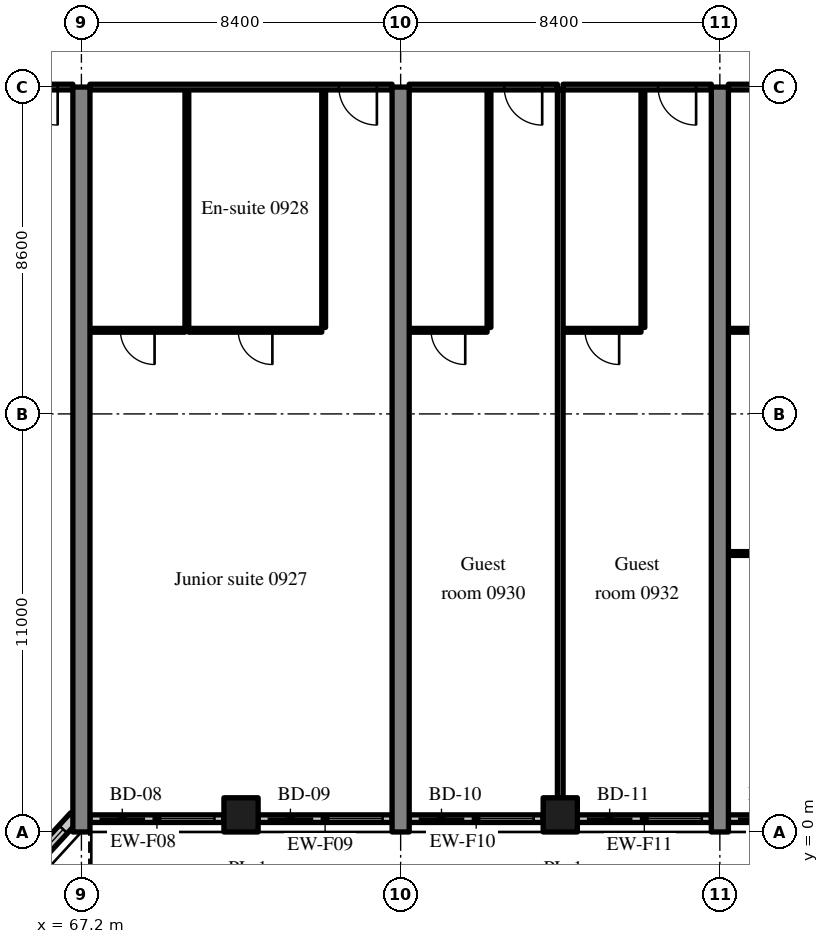
"""IFC4 building model, lengths in metres.
Left out: names, types, materials, properties, quantities, classifications, styles, units other than length and angle.
Written with IfcOpenShell. Run it as: python <this file> out.ifc"""

import sys

from ifc_helpers import new_model, si_unit, direction, frame, frame_2d, origin, origin_2d, place, context, subcontext, project, spatial, rectangle, extrude, source, transform, mapped, element, fill, save


model = new_model("IFC4")
c1 = context("Model", 3, precision=1e-05, world=origin(), true_north=direction((0.0, 1.0)))
c2 = subcontext(c1, "Body", "Model", "MODEL_VIEW")
j1 = project(units=[si_unit("LENGTHUNIT", "METRE"), si_unit("PLANEANGLEUNIT", "RADIAN")], contexts=[c1])
p1 = place(None, origin())
s1 = spatial("IfcSite", under=j1, at=p1, CompositionType="ELEMENT")
p2 = place(p1, origin())
s2 = spatial("IfcBuilding", under=s1, at=p2, CompositionType="ELEMENT")
p3 = place(p2, frame((0.0, 0.0, 43.0)))
s3 = spatial("IfcBuildingStorey", under=s2, at=p3, CompositionType="ELEMENT", Elevation=43.0)
m1 = source(origin(), c2, "Body", "SweptSolid", [
    extrude(rectangle(XDim=19.6, YDim=0.45, at=frame_2d((9.8, 0.0))), origin(), (0.0, 0.0, 1.0), 3.52),
])
for number, where, z_axis, x_axis in (
    (1, (67.2, 0.0, 0.0), (0.0, 0.0, 1.0), (0.0, 1.0, 0.0)),
    (2, (75.6, 0.0, 0.0), (0.0, 0.0, 1.0), (0.0, 1.0, 0.0)),
    (3, (84.0, 0.0, 0.0), (0.0, 0.0, 1.0), (0.0, 1.0, 0.0)),
):
    element("IfcWall", number, at=place(p3, frame(where, z_axis=z_axis, x_axis=x_axis)), inside=s3, PredefinedType="SHEAR", context=c2, shape_type="MappedRepresentation", body=[
        mapped(m1, transform((0.0, 0.0, 0.0), scale=1.0)),
    ])
m2 = source(origin(), c2, "Body", "SweptSolid", [
    extrude(rectangle(XDim=0.9, YDim=0.9, at=origin_2d()), origin(), (0.0, 0.0, 1.0), 3.52),
])
for number, where, z_axis, x_axis in (
    (4, (71.4, 0.45, 0.0), (0.0, 0.0, 1.0), (1.0, 0.0, 0.0)),
    (5, (79.8, 0.45, 0.0), (0.0, 0.0, 1.0), (1.0, 0.0, 0.0)),
):
    element("IfcColumn", number, at=place(p3, frame(where, z_axis=z_axis, x_axis=x_axis)), inside=s3, PredefinedType="COLUMN", context=c2, shape_type="MappedRepresentation", body=[
        mapped(m2, transform((0.0, 0.0, 0.0), scale=1.0)),
    ])
m3 = source(origin(), c2, "Body", "SweptSolid", [
    extrude(rectangle(XDim=2.398, YDim=0.3, at=frame_2d((1.199, 0.0))), origin(), (0.0, 0.0, 1.0), 3.52),
])
p4 = place(p3, frame((65.404, -1.369, 0.0), z_axis=(0.0, 0.0, 1.0), x_axis=(0.675374189419, 0.737475222815, 0.0)))
e6 = element("IfcWall", 6, at=p4, inside=s3, PredefinedType="SOLIDWALL", context=c2, shape_type="MappedRepresentation", body=[
    mapped(m3, transform((0.0, 0.0, 0.0), scale=1.0)),
])
m4 = source(origin(), c2, "Body", "SweptSolid", [
    extrude(rectangle(XDim=1.5, YDim=2.0, at=frame_2d((0.75, 1.0))), frame((0.0, 0.16, 0.0), z_axis=(0.0, -1.0, 0.0), x_axis=(1.0, 0.0, 0.0)), (0.0, 0.0, 1.0), 0.32),
])
p5 = place(p4, frame((0.449, 0.0, 0.9)))
e7 = element("IfcOpeningElement", 7, at=p5, cuts=e6, PredefinedType="OPENING", context=c2, shape_type="MappedRepresentation", body=[
    mapped(m4, transform((0.0, 0.0, 0.0), scale=1.0)),
])
m5 = source(origin(), c2, "Body", "SweptSolid", [
    extrude(rectangle(XDim=3.525, YDim=0.2, at=frame_2d((1.762, 0.0))), origin(), (0.0, 0.0, 1.0), 2.82),
])
p6 = place(p3, frame((67.425, 0.35, 0.0), z_axis=(0.0, 0.0, 1.0), x_axis=(1.0, 0.0, 0.0)))
e8 = element("IfcWall", 8, at=p6, inside=s3, PredefinedType="SOLIDWALL", context=c2, shape_type="MappedRepresentation", body=[
    mapped(m5, transform((0.0, 0.0, 0.0), scale=1.0)),
])
m6 = source(origin(), c2, "Body", "SweptSolid", [
    extrude(rectangle(XDim=1.2, YDim=2.4, at=frame_2d((0.6, 1.2))), frame((0.0, 0.11, 0.0), z_axis=(0.0, -1.0, 0.0), x_axis=(1.0, 0.0, 0.0)), (0.0, 0.0, 1.0), 0.22),
])
p7 = place(p6, frame((0.25, 0.0, 0.0)))
e9 = element("IfcOpeningElement", 9, at=p7, cuts=e8, PredefinedType="OPENING", context=c2, shape_type="MappedRepresentation", body=[
    mapped(m6, transform((0.0, 0.0, 0.0), scale=1.0)),
])
m7 = source(origin(), c2, "Body", "SweptSolid", [
    extrude(rectangle(XDim=1.5, YDim=1.5, at=frame_2d((0.75, 0.75))), frame((0.0, 0.11, 0.0), z_axis=(0.0, -1.0, 0.0), x_axis=(1.0, 0.0, 0.0)), (0.0, 0.0, 1.0), 0.22),
])
p8 = place(p6, frame((1.775, 0.0, 0.9)))
e10 = element("IfcOpeningElement", 10, at=p8, cuts=e8, PredefinedType="OPENING", context=c2, shape_type="MappedRepresentation", body=[
    mapped(m7, transform((0.0, 0.0, 0.0), scale=1.0)),
])
p9 = place(p3, frame((71.85, 0.35, 0.0), z_axis=(0.0, 0.0, 1.0), x_axis=(1.0, 0.0, 0.0)))
e11 = element("IfcWall", 11, at=p9, inside=s3, PredefinedType="SOLIDWALL", context=c2, shape_type="MappedRepresentation", body=[
    mapped(m5, transform((0.0, 0.0, 0.0), scale=1.0)),
])
p10 = place(p9, frame((0.25, 0.0, 0.0)))
e12 = element("IfcOpeningElement", 12, at=p10, cuts=e11, PredefinedType="OPENING", context=c2, shape_type="MappedRepresentation", body=[
    mapped(m6, transform((0.0, 0.0, 0.0), scale=1.0)),
])
p11 = place(p9, frame((1.775, 0.0, 0.9)))
e13 = element("IfcOpeningElement", 13, at=p11, cuts=e11, PredefinedType="OPENING", context=c2, shape_type="MappedRepresentation", body=[
    mapped(m7, transform((0.0, 0.0, 0.0), scale=1.0)),
])
m8 = source(origin(), c2, "Body", "SweptSolid", [
    extrude(rectangle(XDim=3.525, YDim=0.2, at=frame_2d((1.763, 0.0))), origin(), (0.0, 0.0, 1.0), 2.82),
])
p12 = place(p3, frame((75.825, 0.35, 0.0), z_axis=(0.0, 0.0, 1.0), x_axis=(1.0, 0.0, 0.0)))
e14 = element("IfcWall", 14, at=p12, inside=s3, PredefinedType="SOLIDWALL", context=c2, shape_type="MappedRepresentation", body=[
    mapped(m8, transform((0.0, 0.0, 0.0), scale=1.0)),
])
p13 = place(p12, frame((0.25, 0.0, 0.0)))
e15 = element("IfcOpeningElement", 15, at=p13, cuts=e14, PredefinedType="OPENING", context=c2, shape_type="MappedRepresentation", body=[
    mapped(m6, transform((0.0, 0.0, 0.0), scale=1.0)),
])
p14 = place(p12, frame((1.775, 0.0, 0.9)))
e16 = element("IfcOpeningElement", 16, at=p14, cuts=e14, PredefinedType="OPENING", context=c2, shape_type="MappedRepresentation", body=[
    mapped(m7, transform((0.0, 0.0, 0.0), scale=1.0)),
])
p15 = place(p3, frame((80.25, 0.35, 0.0), z_axis=(0.0, 0.0, 1.0), x_axis=(1.0, 0.0, 0.0)))
e17 = element("IfcWall", 17, at=p15, inside=s3, PredefinedType="SOLIDWALL", context=c2, shape_type="MappedRepresentation", body=[
    mapped(m5, transform((0.0, 0.0, 0.0), scale=1.0)),
])
p16 = place(p15, frame((0.25, 0.0, 0.0)))
e18 = element("IfcOpeningElement", 18, at=p16, cuts=e17, PredefinedType="OPENING", context=c2, shape_type="MappedRepresentation", body=[
    mapped(m6, transform((0.0, 0.0, 0.0), scale=1.0)),
])
p17 = place(p15, frame((1.775, 0.0, 0.9)))
e19 = element("IfcOpeningElement", 19, at=p17, cuts=e17, PredefinedType="OPENING", context=c2, shape_type="MappedRepresentation", body=[
    mapped(m7, transform((0.0, 0.0, 0.0), scale=1.0)),
])
p18 = place(p3, frame((84.225, 0.35, 0.0), z_axis=(0.0, 0.0, 1.0), x_axis=(1.0, 0.0, 0.0)))
e20 = element("IfcWall", 20, at=p18, inside=s3, PredefinedType="SOLIDWALL", context=c2, shape_type="MappedRepresentation", body=[
    mapped(m5, transform((0.0, 0.0, 0.0), scale=1.0)),
])
p19 = place(p18, frame((0.25, 0.0, 0.0)))
e21 = element("IfcOpeningElement", 21, at=p19, cuts=e20, PredefinedType="OPENING", context=c2, shape_type="MappedRepresentation", body=[
    mapped(m6, transform((0.0, 0.0, 0.0), scale=1.0)),
])
p20 = place(p18, frame((1.775, 0.0, 0.9)))
e22 = element("IfcOpeningElement", 22, at=p20, cuts=e20, PredefinedType="OPENING", context=c2, shape_type="MappedRepresentation", body=[
    mapped(m7, transform((0.0, 0.0, 0.0), scale=1.0)),
])
m9 = source(origin(), c2, "Body", "SweptSolid", [
    extrude(rectangle(XDim=3.9, YDim=0.15, at=frame_2d((1.95, 0.0))), origin(), (0.0, 0.0, 1.0), 2.82),
])
p21 = place(p3, frame((63.075, 19.6, 0.0), z_axis=(0.0, 0.0, 1.0), x_axis=(1.0, 0.0, 0.0)))
e23 = element("IfcWall", 23, at=p21, inside=s3, PredefinedType="PARTITIONING", context=c2, shape_type="MappedRepresentation", body=[
    mapped(m9, transform((0.0, 0.0, 0.0), scale=1.0)),
])
m10 = source(origin(), c2, "Body", "SweptSolid", [
    extrude(rectangle(XDim=1.0, YDim=2.1, at=frame_2d((0.5, 1.05))), frame((0.0, 0.085, 0.0), z_axis=(0.0, -1.0, 0.0), x_axis=(1.0, 0.0, 0.0)), (0.0, 0.0, 1.0), 0.17),
])
p22 = place(p21, frame((2.5, 0.0, 0.0)))
e24 = element("IfcOpeningElement", 24, at=p22, cuts=e23, PredefinedType="OPENING", context=c2, shape_type="MappedRepresentation", body=[
    mapped(m10, transform((0.0, 0.0, 0.0), scale=1.0)),
])
m11 = source(origin(), c2, "Body", "SweptSolid", [
    extrude(rectangle(XDim=6.25, YDim=0.1, at=frame_2d((3.125, 0.0))), origin(), (0.0, 0.0, 1.0), 3.52),
])
for number, where, z_axis, x_axis in (
    (25, (73.575, 13.275, 0.0), (0.0, 0.0, 1.0), (0.0, 1.0, 0.0)),
    (26, (69.975, 13.275, 0.0), (0.0, 0.0, 1.0), (0.0, 1.0, 0.0)),
):
    element("IfcWall", number, at=place(p3, frame(where, z_axis=z_axis, x_axis=x_axis)), inside=s3, PredefinedType="PARTITIONING", context=c2, shape_type="MappedRepresentation", body=[
        mapped(m11, transform((0.0, 0.0, 0.0), scale=1.0)),
    ])
m12 = source(origin(), c2, "Body", "SweptSolid", [
    extrude(rectangle(XDim=3.5, YDim=0.1, at=frame_2d((1.75, 0.0))), origin(), (0.0, 0.0, 1.0), 3.52),
])
p23 = place(p3, frame((70.025, 13.2, 0.0), z_axis=(0.0, 0.0, 1.0), x_axis=(1.0, 0.0, 0.0)))
e27 = element("IfcWall", 27, at=p23, inside=s3, PredefinedType="PARTITIONING", context=c2, shape_type="MappedRepresentation", body=[
    mapped(m12, transform((0.0, 0.0, 0.0), scale=1.0)),
])
m13 = source(origin(), c2, "Body", "SweptSolid", [
    extrude(rectangle(XDim=0.9, YDim=2.1, at=frame_2d((0.45, 1.05))), frame((0.0, 0.06, 0.0), z_axis=(0.0, -1.0, 0.0), x_axis=(1.0, 0.0, 0.0)), (0.0, 0.0, 1.0), 0.12),
])
p24 = place(p23, frame((1.3, 0.0, 0.0)))
e28 = element("IfcOpeningElement", 28, at=p24, cuts=e27, PredefinedType="OPENING", context=c2, shape_type="MappedRepresentation", body=[
    mapped(m13, transform((0.0, 0.0, 0.0), scale=1.0)),
])
m14 = source(origin(), c2, "Body", "SweptSolid", [
    extrude(rectangle(XDim=2.5, YDim=0.1, at=frame_2d((1.25, 0.0))), origin(), (0.0, 0.0, 1.0), 3.52),
])
p25 = place(p3, frame((67.425, 13.2, 0.0), z_axis=(0.0, 0.0, 1.0), x_axis=(1.0, 0.0, 0.0)))
e29 = element("IfcWall", 29, at=p25, inside=s3, PredefinedType="PARTITIONING", context=c2, shape_type="MappedRepresentation", body=[
    mapped(m14, transform((0.0, 0.0, 0.0), scale=1.0)),
])
p26 = place(p25, frame((0.8, 0.0, 0.0)))
e30 = element("IfcOpeningElement", 30, at=p26, cuts=e29, PredefinedType="OPENING", context=c2, shape_type="MappedRepresentation", body=[
    mapped(m13, transform((0.0, 0.0, 0.0), scale=1.0)),
])
m15 = source(origin(), c2, "Body", "SweptSolid", [
    extrude(rectangle(XDim=7.95, YDim=0.15, at=frame_2d((3.975, 0.0))), origin(), (0.0, 0.0, 1.0), 2.82),
])
p27 = place(p3, frame((67.425, 19.6, 0.0), z_axis=(0.0, 0.0, 1.0), x_axis=(1.0, 0.0, 0.0)))
e31 = element("IfcWall", 31, at=p27, inside=s3, PredefinedType="PARTITIONING", context=c2, shape_type="MappedRepresentation", body=[
    mapped(m15, transform((0.0, 0.0, 0.0), scale=1.0)),
])
p28 = place(p27, frame((6.55, 0.0, 0.0)))
e32 = element("IfcOpeningElement", 32, at=p28, cuts=e31, PredefinedType="OPENING", context=c2, shape_type="MappedRepresentation", body=[
    mapped(m10, transform((0.0, 0.0, 0.0), scale=1.0)),
])
p29 = place(p3, frame((77.925, 13.275, 0.0), z_axis=(0.0, 0.0, 1.0), x_axis=(0.0, 1.0, 0.0)))
e33 = element("IfcWall", 33, at=p29, inside=s3, PredefinedType="PARTITIONING", context=c2, shape_type="MappedRepresentation", body=[
    mapped(m11, transform((0.0, 0.0, 0.0), scale=1.0)),
])
m16 = source(origin(), c2, "Body", "SweptSolid", [
    extrude(rectangle(XDim=2.05, YDim=0.1, at=frame_2d((1.025, 0.0))), origin(), (0.0, 0.0, 1.0), 3.52),
])
p30 = place(p3, frame((75.825, 13.2, 0.0), z_axis=(0.0, 0.0, 1.0), x_axis=(1.0, 0.0, 0.0)))
e34 = element("IfcWall", 34, at=p30, inside=s3, PredefinedType="PARTITIONING", context=c2, shape_type="MappedRepresentation", body=[
    mapped(m16, transform((0.0, 0.0, 0.0), scale=1.0)),
])
p31 = place(p30, frame((0.575, 0.0, 0.0)))
e35 = element("IfcOpeningElement", 35, at=p31, cuts=e34, PredefinedType="OPENING", context=c2, shape_type="MappedRepresentation", body=[
    mapped(m13, transform((0.0, 0.0, 0.0), scale=1.0)),
])
p32 = place(p3, frame((75.825, 19.6, 0.0), z_axis=(0.0, 0.0, 1.0), x_axis=(1.0, 0.0, 0.0)))
e36 = element("IfcWall", 36, at=p32, inside=s3, PredefinedType="PARTITIONING", context=c2, shape_type="MappedRepresentation", body=[
    mapped(m9, transform((0.0, 0.0, 0.0), scale=1.0)),
])
p33 = place(p32, frame((2.5, 0.0, 0.0)))
e37 = element("IfcOpeningElement", 37, at=p33, cuts=e36, PredefinedType="OPENING", context=c2, shape_type="MappedRepresentation", body=[
    mapped(m10, transform((0.0, 0.0, 0.0), scale=1.0)),
])
p34 = place(p3, frame((81.975, 13.275, 0.0), z_axis=(0.0, 0.0, 1.0), x_axis=(0.0, 1.0, 0.0)))
e38 = element("IfcWall", 38, at=p34, inside=s3, PredefinedType="PARTITIONING", context=c2, shape_type="MappedRepresentation", body=[
    mapped(m11, transform((0.0, 0.0, 0.0), scale=1.0)),
])
p35 = place(p3, frame((79.875, 13.2, 0.0), z_axis=(0.0, 0.0, 1.0), x_axis=(1.0, 0.0, 0.0)))
e39 = element("IfcWall", 39, at=p35, inside=s3, PredefinedType="PARTITIONING", context=c2, shape_type="MappedRepresentation", body=[
    mapped(m16, transform((0.0, 0.0, 0.0), scale=1.0)),
])
p36 = place(p35, frame((0.575, 0.0, 0.0)))
e40 = element("IfcOpeningElement", 40, at=p36, cuts=e39, PredefinedType="OPENING", context=c2, shape_type="MappedRepresentation", body=[
    mapped(m13, transform((0.0, 0.0, 0.0), scale=1.0)),
])
m17 = source(origin(), c2, "Body", "SweptSolid", [
    extrude(rectangle(XDim=3.9, YDim=0.15, at=frame_2d((1.95, 0.0))), origin(), (0.0, 0.0, 1.0), 2.82),
])
p37 = place(p3, frame((79.875, 19.6, 0.0), z_axis=(0.0, 0.0, 1.0), x_axis=(1.0, 0.0, 0.0)))
e41 = element("IfcWall", 41, at=p37, inside=s3, PredefinedType="PARTITIONING", context=c2, shape_type="MappedRepresentation", body=[
    mapped(m17, transform((0.0, 0.0, 0.0), scale=1.0)),
])
p38 = place(p37, frame((2.5, 0.0, 0.0)))
e42 = element("IfcOpeningElement", 42, at=p38, cuts=e41, PredefinedType="OPENING", context=c2, shape_type="MappedRepresentation", body=[
    mapped(m10, transform((0.0, 0.0, 0.0), scale=1.0)),
])
m18 = source(origin(), c2, "Body", "SweptSolid", [
    extrude(rectangle(XDim=18.625, YDim=0.15, at=frame_2d((9.312, 0.0))), origin(), (0.0, 0.0, 1.0), 3.52),
])
p39 = place(p3, frame((79.8, 0.9, 0.0), z_axis=(0.0, 0.0, 1.0), x_axis=(0.0, 1.0, 0.0)))
e43 = element("IfcWall", 43, at=p39, inside=s3, PredefinedType="PARTITIONING", context=c2, shape_type="MappedRepresentation", body=[
    mapped(m18, transform((0.0, 0.0, 0.0), scale=1.0)),
])
p40 = place(p3, frame((84.225, 13.2, 0.0), z_axis=(0.0, 0.0, 1.0), x_axis=(1.0, 0.0, 0.0)))
e44 = element("IfcWall", 44, at=p40, inside=s3, PredefinedType="PARTITIONING", context=c2, shape_type="MappedRepresentation", body=[
    mapped(m14, transform((0.0, 0.0, 0.0), scale=1.0)),
])
p41 = place(p40, frame((0.8, 0.0, 0.0)))
e45 = element("IfcOpeningElement", 45, at=p41, cuts=e44, PredefinedType="OPENING", context=c2, shape_type="MappedRepresentation", body=[
    mapped(m13, transform((0.0, 0.0, 0.0), scale=1.0)),
])
m19 = source(origin(), c2, "Body", "SweptSolid", [
    extrude(rectangle(XDim=7.95, YDim=0.1, at=frame_2d((3.975, 0.0))), origin(), (0.0, 0.0, 1.0), 3.52),
])
p42 = place(p3, frame((84.225, 7.327, 0.0), z_axis=(0.0, 0.0, 1.0), x_axis=(1.0, 0.0, 0.0)))
e46 = element("IfcWall", 46, at=p42, inside=s3, PredefinedType="PARTITIONING", context=c2, shape_type="MappedRepresentation", body=[
    mapped(m19, transform((0.0, 0.0, 0.0), scale=1.0)),
])
m20 = source(origin(), c2, "Body", "SweptSolid", [
    extrude(rectangle(XDim=1.8, YDim=2.1, at=frame_2d((0.9, 1.05))), frame((0.0, 0.06, 0.0), z_axis=(0.0, -1.0, 0.0), x_axis=(1.0, 0.0, 0.0)), (0.0, 0.0, 1.0), 0.12),
])
p43 = place(p42, frame((3.075, 0.0, 0.0)))
e47 = element("IfcOpeningElement", 47, at=p43, cuts=e46, PredefinedType="OPENING", context=c2, shape_type="MappedRepresentation", body=[
    mapped(m20, transform((0.0, 0.0, 0.0), scale=1.0)),
])
p44 = place(p3, frame((84.225, 19.6, 0.0), z_axis=(0.0, 0.0, 1.0), x_axis=(1.0, 0.0, 0.0)))
e48 = element("IfcWall", 48, at=p44, inside=s3, PredefinedType="PARTITIONING", context=c2, shape_type="MappedRepresentation", body=[
    mapped(m15, transform((0.0, 0.0, 0.0), scale=1.0)),
])
p45 = place(p44, frame((6.55, 0.0, 0.0)))
e49 = element("IfcOpeningElement", 49, at=p45, cuts=e48, PredefinedType="OPENING", context=c2, shape_type="MappedRepresentation", body=[
    mapped(m10, transform((0.0, 0.0, 0.0), scale=1.0)),
])
m21 = source(origin(), c2, "Body", "SweptSolid", [
    extrude(rectangle(XDim=1.5, YDim=2.0, at=frame_2d((0.75, 1.0))), frame((0.0, 0.03, 0.0), z_axis=(0.0, -1.0, 0.0), x_axis=(1.0, 0.0, 0.0)), (0.0, 0.0, 1.0), 0.06),
])
p46 = place(p5, origin())
e50 = element("IfcWindow", 50, at=p46, inside=s3, PartitioningType="SINGLE_PANEL", PredefinedType="WINDOW", context=c2, shape_type="MappedRepresentation", body=[
    mapped(m21, transform((0.0, 0.0, 0.0), scale=1.0)),
])
fill(e7, e50)
m22 = source(origin(), c2, "Body", "SweptSolid", [
    extrude(rectangle(XDim=1.2, YDim=2.4, at=frame_2d((0.6, 1.2))), frame((0.0, 0.025, 0.0), z_axis=(0.0, -1.0, 0.0), x_axis=(1.0, 0.0, 0.0)), (0.0, 0.0, 1.0), 0.05),
])
p47 = place(p7, origin())
e51 = element("IfcDoor", 51, at=p47, inside=s3, OperationType="SLIDING_TO_RIGHT", PredefinedType="DOOR", context=c2, shape_type="MappedRepresentation", body=[
    mapped(m22, transform((0.0, 0.0, 0.0), scale=1.0)),
])
fill(e9, e51)
m23 = source(origin(), c2, "Body", "SweptSolid", [
    extrude(rectangle(XDim=1.5, YDim=1.5, at=frame_2d((0.75, 0.75))), frame((0.0, 0.03, 0.0), z_axis=(0.0, -1.0, 0.0), x_axis=(1.0, 0.0, 0.0)), (0.0, 0.0, 1.0), 0.06),
])
p48 = place(p8, origin())
e52 = element("IfcWindow", 52, at=p48, inside=s3, PartitioningType="SINGLE_PANEL", PredefinedType="WINDOW", context=c2, shape_type="MappedRepresentation", body=[
    mapped(m23, transform((0.0, 0.0, 0.0), scale=1.0)),
])
fill(e10, e52)
p49 = place(p10, origin())
e53 = element("IfcDoor", 53, at=p49, inside=s3, OperationType="SLIDING_TO_LEFT", PredefinedType="DOOR", context=c2, shape_type="MappedRepresentation", body=[
    mapped(m22, transform((0.0, 0.0, 0.0), scale=1.0)),
])
fill(e12, e53)
p50 = place(p11, origin())
e54 = element("IfcWindow", 54, at=p50, inside=s3, PartitioningType="SINGLE_PANEL", PredefinedType="WINDOW", context=c2, shape_type="MappedRepresentation", body=[
    mapped(m23, transform((0.0, 0.0, 0.0), scale=1.0)),
])
fill(e13, e54)
p51 = place(p13, origin())
e55 = element("IfcDoor", 55, at=p51, inside=s3, OperationType="SLIDING_TO_RIGHT", PredefinedType="DOOR", context=c2, shape_type="MappedRepresentation", body=[
    mapped(m22, transform((0.0, 0.0, 0.0), scale=1.0)),
])
fill(e15, e55)
p52 = place(p14, origin())
e56 = element("IfcWindow", 56, at=p52, inside=s3, PartitioningType="SINGLE_PANEL", PredefinedType="WINDOW", context=c2, shape_type="MappedRepresentation", body=[
    mapped(m23, transform((0.0, 0.0, 0.0), scale=1.0)),
])
fill(e16, e56)
p53 = place(p16, origin())
e57 = element("IfcDoor", 57, at=p53, inside=s3, OperationType="SLIDING_TO_LEFT", PredefinedType="DOOR", context=c2, shape_type="MappedRepresentation", body=[
    mapped(m22, transform((0.0, 0.0, 0.0), scale=1.0)),
])
fill(e18, e57)
p54 = place(p17, origin())
e58 = element("IfcWindow", 58, at=p54, inside=s3, PartitioningType="SINGLE_PANEL", PredefinedType="WINDOW", context=c2, shape_type="MappedRepresentation", body=[
    mapped(m23, transform((0.0, 0.0, 0.0), scale=1.0)),
])
fill(e19, e58)
p55 = place(p19, origin())
e59 = element("IfcDoor", 59, at=p55, inside=s3, OperationType="SLIDING_TO_RIGHT", PredefinedType="DOOR", context=c2, shape_type="MappedRepresentation", body=[
    mapped(m22, transform((0.0, 0.0, 0.0), scale=1.0)),
])
fill(e21, e59)
m24 = source(origin(), c2, "Body", "SweptSolid", [
    extrude(rectangle(XDim=1.0, YDim=2.1, at=frame_2d((0.5, 1.05))), frame((0.0, 0.025, 0.0), z_axis=(0.0, -1.0, 0.0), x_axis=(1.0, 0.0, 0.0)), (0.0, 0.0, 1.0), 0.05),
])
p56 = place(p22, origin())
e60 = element("IfcDoor", 60, at=p56, inside=s3, OperationType="SINGLE_SWING_RIGHT", PredefinedType="DOOR", context=c2, shape_type="MappedRepresentation", body=[
    mapped(m24, transform((0.0, 0.0, 0.0), scale=1.0)),
])
fill(e24, e60)
m25 = source(origin(), c2, "Body", "SweptSolid", [
    extrude(rectangle(XDim=0.9, YDim=2.1, at=frame_2d((0.45, 1.05))), frame((0.0, 0.025, 0.0), z_axis=(0.0, -1.0, 0.0), x_axis=(1.0, 0.0, 0.0)), (0.0, 0.0, 1.0), 0.05),
])
p57 = place(p24, origin())
e61 = element("IfcDoor", 61, at=p57, inside=s3, OperationType="SINGLE_SWING_RIGHT", PredefinedType="DOOR", context=c2, shape_type="MappedRepresentation", body=[
    mapped(m25, transform((0.0, 0.0, 0.0), scale=1.0)),
])
fill(e28, e61)
p58 = place(p26, origin())
e62 = element("IfcDoor", 62, at=p58, inside=s3, OperationType="SINGLE_SWING_RIGHT", PredefinedType="DOOR", context=c2, shape_type="MappedRepresentation", body=[
    mapped(m25, transform((0.0, 0.0, 0.0), scale=1.0)),
])
fill(e30, e62)
p59 = place(p28, origin())
e63 = element("IfcDoor", 63, at=p59, inside=s3, OperationType="SINGLE_SWING_RIGHT", PredefinedType="DOOR", context=c2, shape_type="MappedRepresentation", body=[
    mapped(m24, transform((0.0, 0.0, 0.0), scale=1.0)),
])
fill(e32, e63)
p60 = place(p31, origin())
e64 = element("IfcDoor", 64, at=p60, inside=s3, OperationType="SINGLE_SWING_RIGHT", PredefinedType="DOOR", context=c2, shape_type="MappedRepresentation", body=[
    mapped(m25, transform((0.0, 0.0, 0.0), scale=1.0)),
])
fill(e35, e64)
p61 = place(p33, origin())
e65 = element("IfcDoor", 65, at=p61, inside=s3, OperationType="SINGLE_SWING_RIGHT", PredefinedType="DOOR", context=c2, shape_type="MappedRepresentation", body=[
    mapped(m24, transform((0.0, 0.0, 0.0), scale=1.0)),
])
fill(e37, e65)
p62 = place(p36, origin())
e66 = element("IfcDoor", 66, at=p62, inside=s3, OperationType="SINGLE_SWING_RIGHT", PredefinedType="DOOR", context=c2, shape_type="MappedRepresentation", body=[
    mapped(m25, transform((0.0, 0.0, 0.0), scale=1.0)),
])
fill(e40, e66)
p63 = place(p38, origin())
e67 = element("IfcDoor", 67, at=p63, inside=s3, OperationType="SINGLE_SWING_RIGHT", PredefinedType="DOOR", context=c2, shape_type="MappedRepresentation", body=[
    mapped(m24, transform((0.0, 0.0, 0.0), scale=1.0)),
])
fill(e42, e67)
save(model, sys.argv[1])
